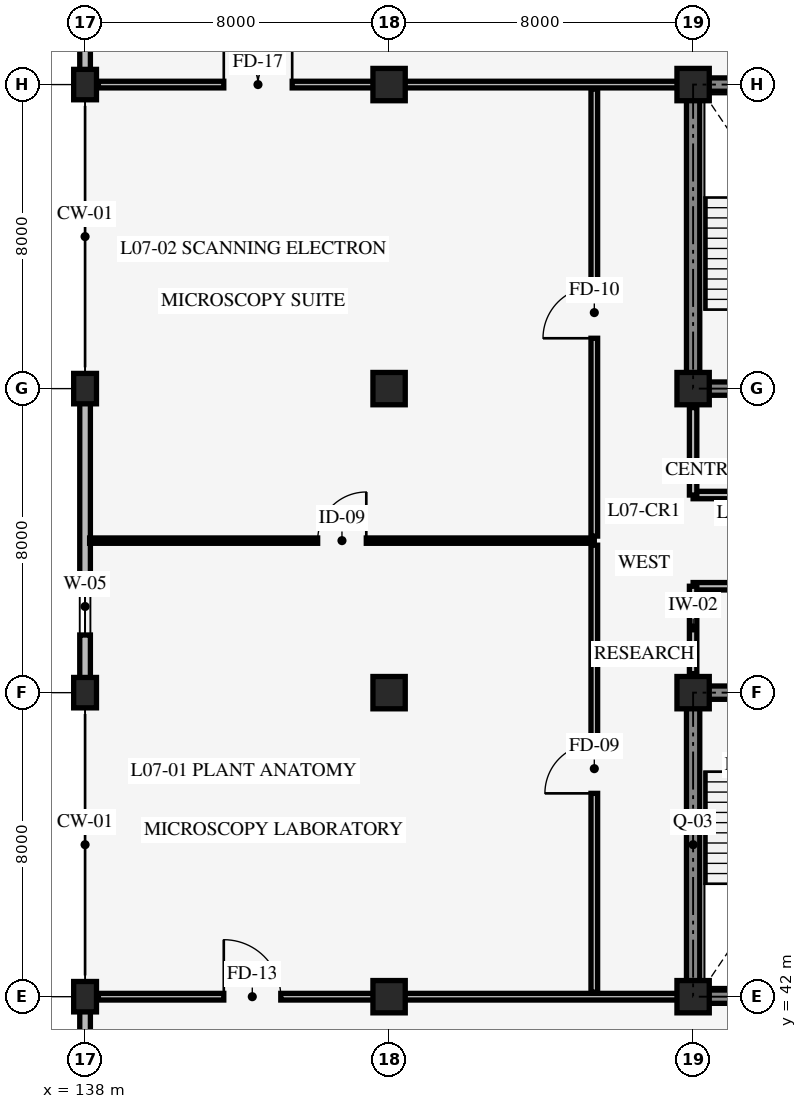
"""IFC4 building model, lengths in metres.
Left out: names, types, materials, properties, quantities, classifications, styles, units other than length and angle.
Written with IfcOpenShell. Run it as: python <this file> out.ifc"""

import sys

from ifc_helpers import new_model, si_unit, direction, frame, frame_2d, origin, origin_2d, place, context, subcontext, project, spatial, rectangle, extrude, element, fill, save


model = new_model("IFC4")
c1 = context("Model", 3, precision=1e-05, world=origin(), true_north=direction((0.0, 1.0)))
c2 = subcontext(c1, "Body", "Model", "MODEL_VIEW")
j1 = project(units=[si_unit("LENGTHUNIT", "METRE"), si_unit("PLANEANGLEUNIT", "RADIAN")], contexts=[c1])
p1 = place(None, origin())
s1 = spatial("IfcSite", under=j1, at=p1, CompositionType="ELEMENT")
p2 = place(p1, origin())
s2 = spatial("IfcBuilding", under=s1, at=p2, CompositionType="ELEMENT")
p3 = place(p2, frame((0.0, 0.0, 27.6)))
s3 = spatial("IfcBuildingStorey", under=s2, at=p3, CompositionType="ELEMENT", Elevation=27.6)
p4 = place(p3, frame((154.0, 42.0, 0.0), z_axis=(0.0, 0.0, 1.0), x_axis=(1.0, 0.0, 0.0)))
e1 = element("IfcWall", 1, at=p4, inside=s3, PredefinedType="SHEAR", context=c2, shape_type="SweptSolid", body=[
    extrude(rectangle(XDim=8.0, YDim=0.35, at=frame_2d((4.0, 0.0))), origin(), (0.0, 0.0, 1.0), 3.95),
])
p5 = place(p3, frame((162.0, 50.0, 0.0), z_axis=(0.0, 0.0, 1.0), x_axis=(-1.0, 0.0, 0.0)))
e2 = element("IfcWall", 2, at=p5, inside=s3, PredefinedType="SHEAR", context=c2, shape_type="SweptSolid", body=[
    extrude(rectangle(XDim=8.0, YDim=0.35, at=frame_2d((4.0, 0.0))), origin(), (0.0, 0.0, 1.0), 3.95),
])
p6 = place(p5, frame((5.3, 0.0, 0.0)))
e3 = element("IfcOpeningElement", 3, at=p6, cuts=e2, PredefinedType="OPENING", context=c2, shape_type="SweptSolid", body=[
    extrude(rectangle(XDim=1.3, YDim=2.15, at=frame_2d((0.65, 1.075))), frame((0.0, 0.185, 0.0), z_axis=(0.0, -1.0, 0.0), x_axis=(1.0, 0.0, 0.0)), (0.0, 0.0, 1.0), 0.37),
])
p7 = place(p5, frame((1.45, 0.0, 0.0)))
e4 = element("IfcOpeningElement", 4, at=p7, cuts=e2, PredefinedType="OPENING", context=c2, shape_type="SweptSolid", body=[
    extrude(rectangle(XDim=1.1, YDim=2.2, at=frame_2d((0.55, 1.1))), frame((0.0, 0.185, 0.0), z_axis=(0.0, -1.0, 0.0), x_axis=(1.0, 0.0, 0.0)), (0.0, 0.0, 1.0), 0.37),
])
p8 = place(p3, frame((154.0, 50.0, 0.0), z_axis=(0.0, 0.0, 1.0), x_axis=(0.0, -1.0, 0.0)))
e5 = element("IfcWall", 5, at=p8, inside=s3, PredefinedType="SHEAR", context=c2, shape_type="SweptSolid", body=[
    extrude(rectangle(XDim=8.0, YDim=0.35, at=frame_2d((4.0, 0.0))), origin(), (0.0, 0.0, 1.0), 3.95),
])
p9 = place(p3, frame((154.0, 58.0, 0.0), z_axis=(0.0, 0.0, 1.0), x_axis=(1.0, 0.0, 0.0)))
e6 = element("IfcWall", 6, at=p9, inside=s3, PredefinedType="SHEAR", context=c2, shape_type="SweptSolid", body=[
    extrude(rectangle(XDim=8.0, YDim=0.35, at=frame_2d((4.0, 0.0))), origin(), (0.0, 0.0, 1.0), 3.95),
])
p10 = place(p9, frame((1.4, 0.0, 0.0)))
e7 = element("IfcOpeningElement", 7, at=p10, cuts=e6, PredefinedType="OPENING", context=c2, shape_type="SweptSolid", body=[
    extrude(rectangle(XDim=1.3, YDim=2.15, at=frame_2d((0.65, 1.075))), frame((0.0, 0.185, 0.0), z_axis=(0.0, -1.0, 0.0), x_axis=(1.0, 0.0, 0.0)), (0.0, 0.0, 1.0), 0.37),
])
p11 = place(p9, frame((5.3, 0.0, 0.0)))
e8 = element("IfcOpeningElement", 8, at=p11, cuts=e6, PredefinedType="OPENING", context=c2, shape_type="SweptSolid", body=[
    extrude(rectangle(XDim=1.1, YDim=2.2, at=frame_2d((0.55, 1.1))), frame((0.0, 0.185, 0.0), z_axis=(0.0, -1.0, 0.0), x_axis=(1.0, 0.0, 0.0)), (0.0, 0.0, 1.0), 0.37),
])
for number, where, z_axis, x_axis in (
    (9, (162.0, 66.0, 0.0), (0.0, 0.0, 1.0), (-1.0, 0.0, 0.0)),
    (10, (154.0, 66.0, 0.0), (0.0, 0.0, 1.0), (0.0, -1.0, 0.0)),
):
    element("IfcWall", number, at=place(p3, frame(where, z_axis=z_axis, x_axis=x_axis)), inside=s3, PredefinedType="SHEAR", context=c2, shape_type="SweptSolid", body=[
        extrude(rectangle(XDim=8.0, YDim=0.35, at=frame_2d((4.0, 0.0))), origin(), (0.0, 0.0, 1.0), 3.95),
    ])
for number, where, z_axis, x_axis in (
    (11, (138.0, 42.0, 0.0), (0.0, 0.0, 1.0), (1.0, 0.0, 0.0)),
    (12, (138.0, 50.0, 0.0), (0.0, 0.0, 1.0), (1.0, 0.0, 0.0)),
    (13, (138.0, 58.0, 0.0), (0.0, 0.0, 1.0), (1.0, 0.0, 0.0)),
    (14, (138.0, 66.0, 0.0), (0.0, 0.0, 1.0), (1.0, 0.0, 0.0)),
):
    element("IfcColumn", number, at=place(p3, frame(where, z_axis=z_axis, x_axis=x_axis)), inside=s3, PredefinedType="COLUMN", context=c2, shape_type="SweptSolid", body=[
        extrude(rectangle(XDim=0.6, YDim=0.8, at=origin_2d()), origin(), (0.0, 0.0, 1.0), 4.2),
    ])
for number, where, z_axis, x_axis in (
    (15, (146.0, 42.0, 0.0), (0.0, 0.0, 1.0), (1.0, 0.0, 0.0)),
    (16, (146.0, 50.0, 0.0), (0.0, 0.0, 1.0), (1.0, 0.0, 0.0)),
    (17, (146.0, 58.0, 0.0), (0.0, 0.0, 1.0), (1.0, 0.0, 0.0)),
    (18, (146.0, 66.0, 0.0), (0.0, 0.0, 1.0), (1.0, 0.0, 0.0)),
    (19, (154.0, 42.0, 0.0), (0.0, 0.0, 1.0), (1.0, 0.0, 0.0)),
    (20, (154.0, 50.0, 0.0), (0.0, 0.0, 1.0), (1.0, 0.0, 0.0)),
    (21, (154.0, 58.0, 0.0), (0.0, 0.0, 1.0), (1.0, 0.0, 0.0)),
    (22, (154.0, 66.0, 0.0), (0.0, 0.0, 1.0), (1.0, 0.0, 0.0)),
):
    element("IfcColumn", number, at=place(p3, frame(where, z_axis=z_axis, x_axis=x_axis)), inside=s3, PredefinedType="COLUMN", context=c2, shape_type="SweptSolid", body=[
        extrude(rectangle(XDim=0.85, YDim=0.85, at=origin_2d()), origin(), (0.0, 0.0, 1.0), 4.2),
    ])
p12 = place(p3, frame((138.0, 34.0, 0.0), z_axis=(0.0, 0.0, 1.0), x_axis=(0.0, 1.0, 0.0)))
e23 = element("IfcWall", 23, at=p12, inside=s3, PredefinedType="STANDARD", context=c2, shape_type="SweptSolid", body=[
    extrude(rectangle(XDim=8.0, YDim=0.28, at=frame_2d((4.0, 0.0))), origin(), (0.0, 0.0, 1.0), 3.29),
])
p13 = place(p12, frame((3.2, 0.0, 0.85)))
e24 = element("IfcOpeningElement", 24, at=p13, cuts=e23, PredefinedType="OPENING", context=c2, shape_type="SweptSolid", body=[
    extrude(rectangle(XDim=1.6, YDim=1.2, at=frame_2d((0.8, 0.6))), frame((0.0, 0.15, 0.0), z_axis=(0.0, -1.0, 0.0), x_axis=(1.0, 0.0, 0.0)), (0.0, 0.0, 1.0), 0.3),
])
p14 = place(p3, frame((138.0, 50.0, 0.0), z_axis=(0.0, 0.0, 1.0), x_axis=(0.0, 1.0, 0.0)))
e25 = element("IfcWall", 25, at=p14, inside=s3, PredefinedType="STANDARD", context=c2, shape_type="SweptSolid", body=[
    extrude(rectangle(XDim=8.0, YDim=0.28, at=frame_2d((4.0, 0.0))), origin(), (0.0, 0.0, 1.0), 3.29),
])
p15 = place(p14, frame((1.517, 0.0, 0.85)))
e26 = element("IfcOpeningElement", 26, at=p15, cuts=e25, PredefinedType="OPENING", context=c2, shape_type="SweptSolid", body=[
    extrude(rectangle(XDim=1.5, YDim=1.5, at=frame_2d((0.75, 0.75))), frame((0.0, 0.15, 0.0), z_axis=(0.0, -1.0, 0.0), x_axis=(1.0, 0.0, 0.0)), (0.0, 0.0, 1.0), 0.3),
])
p16 = place(p3, frame((138.0, 66.0, 0.0), z_axis=(0.0, 0.0, 1.0), x_axis=(0.0, 1.0, 0.0)))
e27 = element("IfcWall", 27, at=p16, inside=s3, PredefinedType="STANDARD", context=c2, shape_type="SweptSolid", body=[
    extrude(rectangle(XDim=8.0, YDim=0.28, at=frame_2d((4.0, 0.0))), origin(), (0.0, 0.0, 1.0), 3.29),
])
p17 = place(p16, frame((3.4, 0.0, 0.85)))
e28 = element("IfcOpeningElement", 28, at=p17, cuts=e27, PredefinedType="OPENING", context=c2, shape_type="SweptSolid", body=[
    extrude(rectangle(XDim=1.2, YDim=1.2, at=frame_2d((0.6, 0.6))), frame((0.0, 0.15, 0.0), z_axis=(0.0, -1.0, 0.0), x_axis=(1.0, 0.0, 0.0)), (0.0, 0.0, 1.0), 0.3),
])
p18 = place(p3, frame((154.0, 52.8, 0.0), z_axis=(0.0, 0.0, 1.0), x_axis=(1.0, 0.0, 0.0)))
e29 = element("IfcWall", 29, at=p18, inside=s3, PredefinedType="STANDARD", context=c2, shape_type="SweptSolid", body=[
    extrude(rectangle(XDim=7.6, YDim=0.195, at=frame_2d((3.8, 0.0))), origin(), (0.0, 0.0, 1.0), 3.9),
])
p19 = place(p18, frame((2.8, 0.0, 0.0)))
e30 = element("IfcOpeningElement", 30, at=p19, cuts=e29, PredefinedType="OPENING", context=c2, shape_type="SweptSolid", body=[
    extrude(rectangle(XDim=1.25, YDim=2.15, at=frame_2d((0.625, 1.075))), frame((0.0, 0.107, 0.0), z_axis=(0.0, -1.0, 0.0), x_axis=(1.0, 0.0, 0.0)), (0.0, 0.0, 1.0), 0.215),
])
p20 = place(p3, frame((154.0, 50.5, 0.0), z_axis=(0.0, 0.0, 1.0), x_axis=(0.0, 1.0, 0.0)))
e31 = element("IfcWall", 31, at=p20, inside=s3, PredefinedType="STANDARD", context=c2, shape_type="SweptSolid", body=[
    extrude(rectangle(XDim=2.3, YDim=0.195, at=frame_2d((1.15, 0.0))), origin(), (0.0, 0.0, 1.0), 3.29),
])
p21 = place(p3, frame((154.0, 55.2, 0.0), z_axis=(0.0, 0.0, 1.0), x_axis=(1.0, 0.0, 0.0)))
e32 = element("IfcWall", 32, at=p21, inside=s3, PredefinedType="STANDARD", context=c2, shape_type="SweptSolid", body=[
    extrude(rectangle(XDim=7.6, YDim=0.195, at=frame_2d((3.8, 0.0))), origin(), (0.0, 0.0, 1.0), 3.9),
])
p22 = place(p21, frame((2.8, 0.0, 0.0)))
e33 = element("IfcOpeningElement", 33, at=p22, cuts=e32, PredefinedType="OPENING", context=c2, shape_type="SweptSolid", body=[
    extrude(rectangle(XDim=1.35, YDim=2.15, at=frame_2d((0.675, 1.075))), frame((0.0, 0.107, 0.0), z_axis=(0.0, -1.0, 0.0), x_axis=(1.0, 0.0, 0.0)), (0.0, 0.0, 1.0), 0.215),
])
p23 = place(p3, frame((154.0, 55.2, 0.0), z_axis=(0.0, 0.0, 1.0), x_axis=(0.0, 1.0, 0.0)))
e34 = element("IfcWall", 34, at=p23, inside=s3, PredefinedType="STANDARD", context=c2, shape_type="SweptSolid", body=[
    extrude(rectangle(XDim=2.3, YDim=0.195, at=frame_2d((1.15, 0.0))), origin(), (0.0, 0.0, 1.0), 3.29),
])
p24 = place(p3, frame((151.4, 42.12, 0.0), z_axis=(0.0, 0.0, 1.0), x_axis=(0.0, 1.0, 0.0)))
e35 = element("IfcWall", 35, at=p24, inside=s3, PredefinedType="STANDARD", context=c2, shape_type="SweptSolid", body=[
    extrude(rectangle(XDim=11.76, YDim=0.175, at=frame_2d((5.88, 0.0))), origin(), (0.0, 0.0, 1.0), 3.9),
])
p25 = place(p24, frame((5.23, 0.0, 0.0)))
e36 = element("IfcOpeningElement", 36, at=p25, cuts=e35, PredefinedType="OPENING", context=c2, shape_type="SweptSolid", body=[
    extrude(rectangle(XDim=1.3, YDim=2.15, at=frame_2d((0.65, 1.075))), frame((0.0, 0.098, 0.0), z_axis=(0.0, -1.0, 0.0), x_axis=(1.0, 0.0, 0.0)), (0.0, 0.0, 1.0), 0.195),
])
p26 = place(p3, frame((138.12, 54.0, 0.0), z_axis=(0.0, 0.0, 1.0), x_axis=(1.0, 0.0, 0.0)))
e37 = element("IfcWall", 37, at=p26, inside=s3, PredefinedType="STANDARD", context=c2, shape_type="SweptSolid", body=[
    extrude(rectangle(XDim=13.28, YDim=0.14, at=frame_2d((6.64, 0.0))), origin(), (0.0, 0.0, 1.0), 3.9),
])
p27 = place(p26, frame((6.0, 0.0, 0.0)))
e38 = element("IfcOpeningElement", 38, at=p27, cuts=e37, PredefinedType="OPENING", context=c2, shape_type="SweptSolid", body=[
    extrude(rectangle(XDim=1.28, YDim=2.14, at=frame_2d((0.64, 1.07))), frame((0.0, 0.08, 0.0), z_axis=(0.0, -1.0, 0.0), x_axis=(1.0, 0.0, 0.0)), (0.0, 0.0, 1.0), 0.16),
])
p28 = place(p3, frame((151.4, 54.12, 0.0), z_axis=(0.0, 0.0, 1.0), x_axis=(0.0, 1.0, 0.0)))
e39 = element("IfcWall", 39, at=p28, inside=s3, PredefinedType="STANDARD", context=c2, shape_type="SweptSolid", body=[
    extrude(rectangle(XDim=11.76, YDim=0.175, at=frame_2d((5.88, 0.0))), origin(), (0.0, 0.0, 1.0), 3.9),
])
p29 = place(p28, frame((5.205, 0.0, 0.0)))
e40 = element("IfcOpeningElement", 40, at=p29, cuts=e39, PredefinedType="OPENING", context=c2, shape_type="SweptSolid", body=[
    extrude(rectangle(XDim=1.35, YDim=2.15, at=frame_2d((0.675, 1.075))), frame((0.0, 0.098, 0.0), z_axis=(0.0, -1.0, 0.0), x_axis=(1.0, 0.0, 0.0)), (0.0, 0.0, 1.0), 0.195),
])
p30 = place(p3, frame((138.35, 42.0, 0.0), z_axis=(0.0, 0.0, 1.0), x_axis=(1.0, 0.0, 0.0)))
e41 = element("IfcWall", 41, at=p30, inside=s3, PredefinedType="STANDARD", context=c2, shape_type="SweptSolid", body=[
    extrude(rectangle(XDim=15.3, YDim=0.175, at=frame_2d((7.65, 0.0))), origin(), (0.0, 0.0, 1.0), 3.24),
])
p31 = place(p30, frame((3.3, 0.0, 0.0)))
e42 = element("IfcOpeningElement", 42, at=p31, cuts=e41, PredefinedType="OPENING", context=c2, shape_type="SweptSolid", body=[
    extrude(rectangle(XDim=1.5, YDim=2.2, at=frame_2d((0.75, 1.1))), frame((0.0, 0.098, 0.0), z_axis=(0.0, -1.0, 0.0), x_axis=(1.0, 0.0, 0.0)), (0.0, 0.0, 1.0), 0.195),
])
p32 = place(p3, frame((138.35, 66.0, 0.0), z_axis=(0.0, 0.0, 1.0), x_axis=(1.0, 0.0, 0.0)))
e43 = element("IfcWall", 43, at=p32, inside=s3, PredefinedType="STANDARD", context=c2, shape_type="SweptSolid", body=[
    extrude(rectangle(XDim=15.3, YDim=0.175, at=frame_2d((7.65, 0.0))), origin(), (0.0, 0.0, 1.0), 3.24),
])
p33 = place(p32, frame((3.3, 0.0, 0.0)))
e44 = element("IfcOpeningElement", 44, at=p33, cuts=e43, PredefinedType="OPENING", context=c2, shape_type="SweptSolid", body=[
    extrude(rectangle(XDim=1.8, YDim=2.3, at=frame_2d((0.9, 1.15))), frame((0.0, 0.098, 0.0), z_axis=(0.0, -1.0, 0.0), x_axis=(1.0, 0.0, 0.0)), (0.0, 0.0, 1.0), 0.195),
])
p34 = place(p15, origin())
e45 = element("IfcWindow", 45, at=p34, inside=s3, PartitioningType="SINGLE_PANEL", PredefinedType="WINDOW", context=c2, shape_type="SweptSolid", body=[
    extrude(rectangle(XDim=1.5, YDim=1.5, at=frame_2d((0.75, 0.75))), frame((0.0, 0.03, 0.0), z_axis=(0.0, -1.0, 0.0), x_axis=(1.0, 0.0, 0.0)), (0.0, 0.0, 1.0), 0.06),
])
fill(e26, e45)
p35 = place(p25, origin())
e46 = element("IfcDoor", 46, at=p35, inside=s3, OperationType="SINGLE_SWING_LEFT", PredefinedType="DOOR", context=c2, shape_type="SweptSolid", body=[
    extrude(rectangle(XDim=1.3, YDim=2.15, at=frame_2d((0.65, 1.075))), frame((0.0, 0.025, 0.0), z_axis=(0.0, -1.0, 0.0), x_axis=(1.0, 0.0, 0.0)), (0.0, 0.0, 1.0), 0.05),
])
fill(e36, e46)
p36 = place(p27, origin())
e47 = element("IfcDoor", 47, at=p36, inside=s3, OperationType="SINGLE_SWING_RIGHT", PredefinedType="DOOR", context=c2, shape_type="SweptSolid", body=[
    extrude(rectangle(XDim=1.28, YDim=2.14, at=frame_2d((0.64, 1.07))), frame((0.0, 0.025, 0.0), z_axis=(0.0, -1.0, 0.0), x_axis=(1.0, 0.0, 0.0)), (0.0, 0.0, 1.0), 0.05),
])
fill(e38, e47)
p37 = place(p29, origin())
e48 = element("IfcDoor", 48, at=p37, inside=s3, OperationType="SINGLE_SWING_LEFT", PredefinedType="DOOR", context=c2, shape_type="SweptSolid", body=[
    extrude(rectangle(XDim=1.35, YDim=2.15, at=frame_2d((0.675, 1.075))), frame((0.0, 0.025, 0.0), z_axis=(0.0, -1.0, 0.0), x_axis=(1.0, 0.0, 0.0)), (0.0, 0.0, 1.0), 0.05),
])
fill(e40, e48)
p38 = place(p31, origin())
e49 = element("IfcDoor", 49, at=p38, inside=s3, OperationType="SINGLE_SWING_LEFT", PredefinedType="DOOR", context=c2, shape_type="SweptSolid", body=[
    extrude(rectangle(XDim=1.5, YDim=2.2, at=frame_2d((0.75, 1.1))), frame((0.0, 0.025, 0.0), z_axis=(0.0, -1.0, 0.0), x_axis=(1.0, 0.0, 0.0)), (0.0, 0.0, 1.0), 0.05),
])
fill(e42, e49)
p39 = place(p33, origin())
e50 = element("IfcDoor", 50, at=p39, inside=s3, OperationType="DOUBLE_DOOR_SINGLE_SWING", PredefinedType="DOOR", context=c2, shape_type="SweptSolid", body=[
    extrude(rectangle(XDim=1.8, YDim=2.3, at=frame_2d((0.9, 1.15))), frame((0.0, 0.025, 0.0), z_axis=(0.0, -1.0, 0.0), x_axis=(1.0, 0.0, 0.0)), (0.0, 0.0, 1.0), 0.05),
])
fill(e44, e50)
save(model, sys.argv[1])
